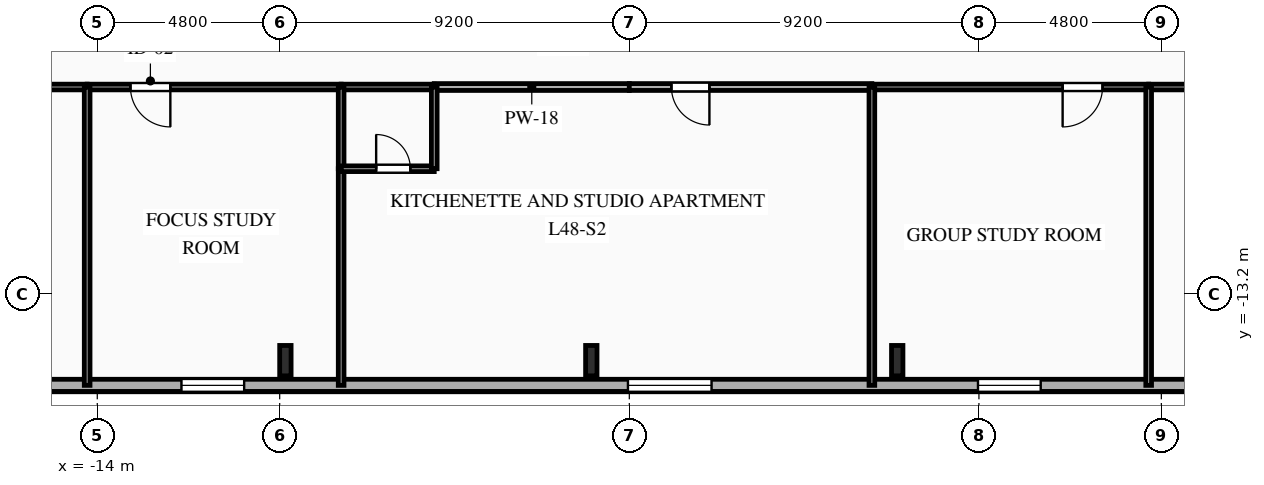
"""IFC4 building model, lengths in metres.
Left out: names, types, materials, properties, quantities, classifications, styles, units other than length and angle.
Written with IfcOpenShell. Run it as: python <this file> out.ifc"""

import sys

from ifc_helpers import new_model, si_unit, direction, frame, frame_2d, origin, origin_2d, place, context, subcontext, project, spatial, rectangle, i_section, extrude, element, fill, save


model = new_model("IFC4")
c1 = context("Model", 3, precision=1e-05, world=origin(), true_north=direction((0.0, 1.0)))
c2 = subcontext(c1, "Body", "Model", "MODEL_VIEW")
j1 = project(units=[si_unit("LENGTHUNIT", "METRE"), si_unit("PLANEANGLEUNIT", "RADIAN")], contexts=[c1])
p1 = place(None, origin())
s1 = spatial("IfcSite", under=j1, at=p1, CompositionType="ELEMENT")
p2 = place(p1, origin())
s2 = spatial("IfcBuilding", under=s1, at=p2, CompositionType="ELEMENT")
p3 = place(p2, frame((0.0, 0.0, 171.2)))
s3 = spatial("IfcBuildingStorey", under=s2, at=p3, CompositionType="ELEMENT", Elevation=171.2)
for number, where, z_axis, x_axis in (
    (1, (-9.05, -14.95, 0.0), (0.0, 0.0, 1.0), (1.0, 0.0, 0.0)),
    (2, (-1.0, -14.95, 0.0), (0.0, 0.0, 1.0), (1.0, 0.0, 0.0)),
    (3, (7.05, -14.95, 0.0), (0.0, 0.0, 1.0), (1.0, 0.0, 0.0)),
):
    element("IfcColumn", number, at=place(p3, frame(where, z_axis=z_axis, x_axis=x_axis)), inside=s3, PredefinedType="COLUMN", context=c2, shape_type="SweptSolid", body=[
        extrude(i_section(OverallWidth=0.3, OverallDepth=0.8, WebThickness=0.018, FlangeThickness=0.033, FilletRadius=0.03, at=origin_2d()), origin(), (0.0, 0.0, 1.0), 3.35),
    ])
p4 = place(p3, frame((23.8, -15.6, 0.0), z_axis=(0.0, 0.0, 1.0), x_axis=(-1.0, 0.0, 0.0)))
e4 = element("IfcWall", 4, at=p4, inside=s3, PredefinedType="SOLIDWALL", context=c2, shape_type="SweptSolid", body=[
    extrude(rectangle(XDim=49.6, YDim=0.32, at=frame_2d((24.8, 0.0))), origin(), (0.0, 0.0, 1.0), 3.0),
])
p5 = place(p4, frame((1.13, 0.0, 0.85)))
e5 = element("IfcOpeningElement", 5, at=p5, cuts=e4, PredefinedType="OPENING", context=c2, shape_type="SweptSolid", body=[
    extrude(rectangle(XDim=1.1, YDim=1.85, at=frame_2d((0.55, 0.925))), frame((0.0, 0.17, 0.0), z_axis=(0.0, -1.0, 0.0), x_axis=(1.0, 0.0, 0.0)), (0.0, 0.0, 1.0), 0.34),
])
p6 = place(p4, frame((5.695, 0.0, 0.85)))
e6 = element("IfcOpeningElement", 6, at=p6, cuts=e4, PredefinedType="OPENING", context=c2, shape_type="SweptSolid", body=[
    extrude(rectangle(XDim=1.65, YDim=1.85, at=frame_2d((0.825, 0.925))), frame((0.0, 0.17, 0.0), z_axis=(0.0, -1.0, 0.0), x_axis=(1.0, 0.0, 0.0)), (0.0, 0.0, 1.0), 0.34),
])
p7 = place(p4, frame((12.975, 0.0, 0.85)))
e7 = element("IfcOpeningElement", 7, at=p7, cuts=e4, PredefinedType="OPENING", context=c2, shape_type="SweptSolid", body=[
    extrude(rectangle(XDim=1.65, YDim=1.85, at=frame_2d((0.825, 0.925))), frame((0.0, 0.17, 0.0), z_axis=(0.0, -1.0, 0.0), x_axis=(1.0, 0.0, 0.0)), (0.0, 0.0, 1.0), 0.34),
])
p8 = place(p4, frame((21.636, 0.0, 0.85)))
e8 = element("IfcOpeningElement", 8, at=p8, cuts=e4, PredefinedType="OPENING", context=c2, shape_type="SweptSolid", body=[
    extrude(rectangle(XDim=2.2, YDim=1.85, at=frame_2d((1.1, 0.925))), frame((0.0, 0.17, 0.0), z_axis=(0.0, -1.0, 0.0), x_axis=(1.0, 0.0, 0.0)), (0.0, 0.0, 1.0), 0.34),
])
p9 = place(p4, frame((33.935, 0.0, 0.85)))
e9 = element("IfcOpeningElement", 9, at=p9, cuts=e4, PredefinedType="OPENING", context=c2, shape_type="SweptSolid", body=[
    extrude(rectangle(XDim=1.65, YDim=1.85, at=frame_2d((0.825, 0.925))), frame((0.0, 0.17, 0.0), z_axis=(0.0, -1.0, 0.0), x_axis=(1.0, 0.0, 0.0)), (0.0, 0.0, 1.0), 0.34),
])
p10 = place(p4, frame((41.24, 0.0, 0.85)))
e10 = element("IfcOpeningElement", 10, at=p10, cuts=e4, PredefinedType="OPENING", context=c2, shape_type="SweptSolid", body=[
    extrude(rectangle(XDim=1.65, YDim=1.85, at=frame_2d((0.825, 0.925))), frame((0.0, 0.17, 0.0), z_axis=(0.0, -1.0, 0.0), x_axis=(1.0, 0.0, 0.0)), (0.0, 0.0, 1.0), 0.34),
])
p11 = place(p4, frame((46.175, 0.0, 0.85)))
e11 = element("IfcOpeningElement", 11, at=p11, cuts=e4, PredefinedType="OPENING", context=c2, shape_type="SweptSolid", body=[
    extrude(rectangle(XDim=1.65, YDim=1.85, at=frame_2d((0.825, 0.925))), frame((0.0, 0.17, 0.0), z_axis=(0.0, -1.0, 0.0), x_axis=(1.0, 0.0, 0.0)), (0.0, 0.0, 1.0), 0.34),
])
p12 = place(p3, frame((-14.267, -7.75, 0.0), z_axis=(0.0, 0.0, 1.0), x_axis=(-1.0, 0.0, 0.0)))
e12 = element("IfcWall", 12, at=p12, inside=s3, PredefinedType="PARTITIONING", context=c2, shape_type="SweptSolid", body=[
    extrude(rectangle(XDim=6.683, YDim=0.15, at=frame_2d((3.342, 0.0))), origin(), (0.0, 0.0, 1.0), 3.0),
])
p13 = place(p12, frame((1.139, 0.0, 0.0)))
e13 = element("IfcOpeningElement", 13, at=p13, cuts=e12, PredefinedType="OPENING", context=c2, shape_type="SweptSolid", body=[
    extrude(rectangle(XDim=1.05, YDim=2.15, at=frame_2d((0.525, 1.075))), frame((0.0, 0.085, 0.0), z_axis=(0.0, -1.0, 0.0), x_axis=(1.0, 0.0, 0.0)), (0.0, 0.0, 1.0), 0.17),
])
p14 = place(p3, frame((-7.583, -7.75, 0.0), z_axis=(0.0, 0.0, 1.0), x_axis=(-1.0, 0.0, 0.0)))
e14 = element("IfcWall", 14, at=p14, inside=s3, PredefinedType="PARTITIONING", context=c2, shape_type="SweptSolid", body=[
    extrude(rectangle(XDim=6.684, YDim=0.15, at=frame_2d((3.342, 0.0))), origin(), (0.0, 0.0, 1.0), 3.0),
])
p15 = place(p14, frame((4.494, 0.0, 0.0)))
e15 = element("IfcOpeningElement", 15, at=p15, cuts=e14, PredefinedType="OPENING", context=c2, shape_type="SweptSolid", body=[
    extrude(rectangle(XDim=1.05, YDim=2.15, at=frame_2d((0.525, 1.075))), frame((0.0, 0.085, 0.0), z_axis=(0.0, -1.0, 0.0), x_axis=(1.0, 0.0, 0.0)), (0.0, 0.0, 1.0), 0.17),
])
p16 = place(p3, frame((0.0, -7.75, 0.0), z_axis=(0.0, 0.0, 1.0), x_axis=(-1.0, 0.0, 0.0)))
e16 = element("IfcWall", 16, at=p16, inside=s3, PredefinedType="PARTITIONING", context=c2, shape_type="SweptSolid", body=[
    extrude(rectangle(XDim=5.133, YDim=0.18, at=frame_2d((2.566, 0.0))), origin(), (0.0, 0.0, 1.0), 3.0),
])
p17 = place(p3, frame((-5.133, -7.75, 0.0), z_axis=(0.0, 0.0, 1.0), x_axis=(-1.0, 0.0, 0.0)))
e17 = element("IfcWall", 17, at=p17, inside=s3, PredefinedType="PLUMBINGWALL", context=c2, shape_type="SweptSolid", body=[
    extrude(rectangle(XDim=2.45, YDim=0.15, at=frame_2d((1.225, 0.0))), origin(), (0.0, 0.0, 1.0), 3.0),
])
p18 = place(p3, frame((6.383, -7.75, 0.0), z_axis=(0.0, 0.0, 1.0), x_axis=(-1.0, 0.0, 0.0)))
e18 = element("IfcWall", 18, at=p18, inside=s3, PredefinedType="PARTITIONING", context=c2, shape_type="SweptSolid", body=[
    extrude(rectangle(XDim=6.383, YDim=0.18, at=frame_2d((3.191, 0.0))), origin(), (0.0, 0.0, 1.0), 3.0),
])
p19 = place(p18, frame((4.275, 0.0, 0.0)))
e19 = element("IfcOpeningElement", 19, at=p19, cuts=e18, PredefinedType="OPENING", context=c2, shape_type="SweptSolid", body=[
    extrude(rectangle(XDim=1.0, YDim=2.15, at=frame_2d((0.5, 1.075))), frame((0.0, 0.1, 0.0), z_axis=(0.0, -1.0, 0.0), x_axis=(1.0, 0.0, 0.0)), (0.0, 0.0, 1.0), 0.2),
])
p20 = place(p3, frame((13.667, -7.75, 0.0), z_axis=(0.0, 0.0, 1.0), x_axis=(-1.0, 0.0, 0.0)))
e20 = element("IfcWall", 20, at=p20, inside=s3, PredefinedType="PARTITIONING", context=c2, shape_type="SweptSolid", body=[
    extrude(rectangle(XDim=7.283, YDim=0.15, at=frame_2d((3.642, 0.0))), origin(), (0.0, 0.0, 1.0), 3.0),
])
p21 = place(p20, frame((1.214, 0.0, 0.0)))
e21 = element("IfcOpeningElement", 21, at=p21, cuts=e20, PredefinedType="OPENING", context=c2, shape_type="SweptSolid", body=[
    extrude(rectangle(XDim=1.05, YDim=2.15, at=frame_2d((0.525, 1.075))), frame((0.0, 0.085, 0.0), z_axis=(0.0, -1.0, 0.0), x_axis=(1.0, 0.0, 0.0)), (0.0, 0.0, 1.0), 0.17),
])
p22 = place(p3, frame((20.95, -7.75, 0.0), z_axis=(0.0, 0.0, 1.0), x_axis=(-1.0, 0.0, 0.0)))
e22 = element("IfcWall", 22, at=p22, inside=s3, PredefinedType="PARTITIONING", context=c2, shape_type="SweptSolid", body=[
    extrude(rectangle(XDim=7.283, YDim=0.15, at=frame_2d((3.642, 0.0))), origin(), (0.0, 0.0, 1.0), 3.0),
])
p23 = place(p22, frame((5.019, 0.0, 0.0)))
e23 = element("IfcOpeningElement", 23, at=p23, cuts=e22, PredefinedType="OPENING", context=c2, shape_type="SweptSolid", body=[
    extrude(rectangle(XDim=1.05, YDim=2.15, at=frame_2d((0.525, 1.075))), frame((0.0, 0.085, 0.0), z_axis=(0.0, -1.0, 0.0), x_axis=(1.0, 0.0, 0.0)), (0.0, 0.0, 1.0), 0.17),
])
p24 = place(p3, frame((-14.267, -7.75, 0.0), z_axis=(0.0, 0.0, 1.0), x_axis=(0.0, -1.0, 0.0)))
e24 = element("IfcWall", 24, at=p24, inside=s3, PredefinedType="PARTITIONING", context=c2, shape_type="SweptSolid", body=[
    extrude(rectangle(XDim=7.85, YDim=0.15, at=frame_2d((3.925, 0.0))), origin(), (0.0, 0.0, 1.0), 3.0),
])
p25 = place(p3, frame((-7.583, -9.9, 0.0), z_axis=(0.0, 0.0, 1.0), x_axis=(0.0, -1.0, 0.0)))
e25 = element("IfcWall", 25, at=p25, inside=s3, PredefinedType="PARTITIONING", context=c2, shape_type="SweptSolid", body=[
    extrude(rectangle(XDim=5.7, YDim=0.15, at=frame_2d((2.85, 0.0))), origin(), (0.0, 0.0, 1.0), 3.0),
])
p26 = place(p3, frame((-7.583, -7.75, 0.0), z_axis=(0.0, 0.0, 1.0), x_axis=(0.0, -1.0, 0.0)))
e26 = element("IfcWall", 26, at=p26, inside=s3, PredefinedType="PLUMBINGWALL", context=c2, shape_type="SweptSolid", body=[
    extrude(rectangle(XDim=2.15, YDim=0.15, at=frame_2d((1.075, 0.0))), origin(), (0.0, 0.0, 1.0), 3.0),
])
p27 = place(p3, frame((-7.583, -9.9, 0.0), z_axis=(0.0, 0.0, 1.0), x_axis=(1.0, 0.0, 0.0)))
e27 = element("IfcWall", 27, at=p27, inside=s3, PredefinedType="PLUMBINGWALL", context=c2, shape_type="SweptSolid", body=[
    extrude(rectangle(XDim=2.45, YDim=0.15, at=frame_2d((1.225, 0.0))), origin(), (0.0, 0.0, 1.0), 3.0),
])
p28 = place(p27, frame((0.921, 0.0, 0.0)))
e28 = element("IfcOpeningElement", 28, at=p28, cuts=e27, PredefinedType="OPENING", context=c2, shape_type="SweptSolid", body=[
    extrude(rectangle(XDim=0.9, YDim=2.1, at=frame_2d((0.45, 1.05))), frame((0.0, 0.085, 0.0), z_axis=(0.0, -1.0, 0.0), x_axis=(1.0, 0.0, 0.0)), (0.0, 0.0, 1.0), 0.17),
])
p29 = place(p3, frame((-5.133, -9.9, 0.0), z_axis=(0.0, 0.0, 1.0), x_axis=(0.0, 1.0, 0.0)))
e29 = element("IfcWall", 29, at=p29, inside=s3, PredefinedType="PLUMBINGWALL", context=c2, shape_type="SweptSolid", body=[
    extrude(rectangle(XDim=2.15, YDim=0.15, at=frame_2d((1.075, 0.0))), origin(), (0.0, 0.0, 1.0), 3.0),
])
for number, where, z_axis, x_axis in (
    (30, (6.383, -7.75, 0.0), (0.0, 0.0, 1.0), (0.0, -1.0, 0.0)),
    (31, (13.667, -7.75, 0.0), (0.0, 0.0, 1.0), (0.0, -1.0, 0.0)),
):
    element("IfcWall", number, at=place(p3, frame(where, z_axis=z_axis, x_axis=x_axis)), inside=s3, PredefinedType="PARTITIONING", context=c2, shape_type="SweptSolid", body=[
        extrude(rectangle(XDim=7.85, YDim=0.15, at=frame_2d((3.925, 0.0))), origin(), (0.0, 0.0, 1.0), 3.0),
    ])
p30 = place(p7, origin())
e32 = element("IfcWindow", 32, at=p30, inside=s3, PartitioningType="SINGLE_PANEL", PredefinedType="WINDOW", context=c2, shape_type="SweptSolid", body=[
    extrude(rectangle(XDim=1.65, YDim=1.85, at=frame_2d((0.825, 0.925))), frame((0.0, 0.03, 0.0), z_axis=(0.0, -1.0, 0.0), x_axis=(1.0, 0.0, 0.0)), (0.0, 0.0, 1.0), 0.06),
])
fill(e7, e32)
p31 = place(p8, origin())
e33 = element("IfcWindow", 33, at=p31, inside=s3, PartitioningType="SINGLE_PANEL", PredefinedType="WINDOW", context=c2, shape_type="SweptSolid", body=[
    extrude(rectangle(XDim=2.2, YDim=1.85, at=frame_2d((1.1, 0.925))), frame((0.0, 0.03, 0.0), z_axis=(0.0, -1.0, 0.0), x_axis=(1.0, 0.0, 0.0)), (0.0, 0.0, 1.0), 0.06),
])
fill(e8, e33)
p32 = place(p9, origin())
e34 = element("IfcWindow", 34, at=p32, inside=s3, PartitioningType="SINGLE_PANEL", PredefinedType="WINDOW", context=c2, shape_type="SweptSolid", body=[
    extrude(rectangle(XDim=1.65, YDim=1.85, at=frame_2d((0.825, 0.925))), frame((0.0, 0.03, 0.0), z_axis=(0.0, -1.0, 0.0), x_axis=(1.0, 0.0, 0.0)), (0.0, 0.0, 1.0), 0.06),
])
fill(e9, e34)
p33 = place(p15, origin())
e35 = element("IfcDoor", 35, at=p33, inside=s3, OperationType="SINGLE_SWING_LEFT", PredefinedType="DOOR", context=c2, shape_type="SweptSolid", body=[
    extrude(rectangle(XDim=1.05, YDim=2.15, at=frame_2d((0.525, 1.075))), frame((0.0, 0.025, 0.0), z_axis=(0.0, -1.0, 0.0), x_axis=(1.0, 0.0, 0.0)), (0.0, 0.0, 1.0), 0.05),
])
fill(e15, e35)
p34 = place(p19, origin())
e36 = element("IfcDoor", 36, at=p34, inside=s3, OperationType="SINGLE_SWING_LEFT", PredefinedType="DOOR", context=c2, shape_type="SweptSolid", body=[
    extrude(rectangle(XDim=1.0, YDim=2.15, at=frame_2d((0.5, 1.075))), frame((0.0, 0.025, 0.0), z_axis=(0.0, -1.0, 0.0), x_axis=(1.0, 0.0, 0.0)), (0.0, 0.0, 1.0), 0.05),
])
fill(e19, e36)
p35 = place(p21, origin())
e37 = element("IfcDoor", 37, at=p35, inside=s3, OperationType="SINGLE_SWING_RIGHT", PredefinedType="DOOR", context=c2, shape_type="SweptSolid", body=[
    extrude(rectangle(XDim=1.05, YDim=2.15, at=frame_2d((0.525, 1.075))), frame((0.0, 0.025, 0.0), z_axis=(0.0, -1.0, 0.0), x_axis=(1.0, 0.0, 0.0)), (0.0, 0.0, 1.0), 0.05),
])
fill(e21, e37)
p36 = place(p28, origin())
e38 = element("IfcDoor", 38, at=p36, inside=s3, OperationType="SINGLE_SWING_LEFT", PredefinedType="DOOR", context=c2, shape_type="SweptSolid", body=[
    extrude(rectangle(XDim=0.9, YDim=2.1, at=frame_2d((0.45, 1.05))), frame((0.0, 0.025, 0.0), z_axis=(0.0, -1.0, 0.0), x_axis=(1.0, 0.0, 0.0)), (0.0, 0.0, 1.0), 0.05),
])
fill(e28, e38)
save(model, sys.argv[1])
